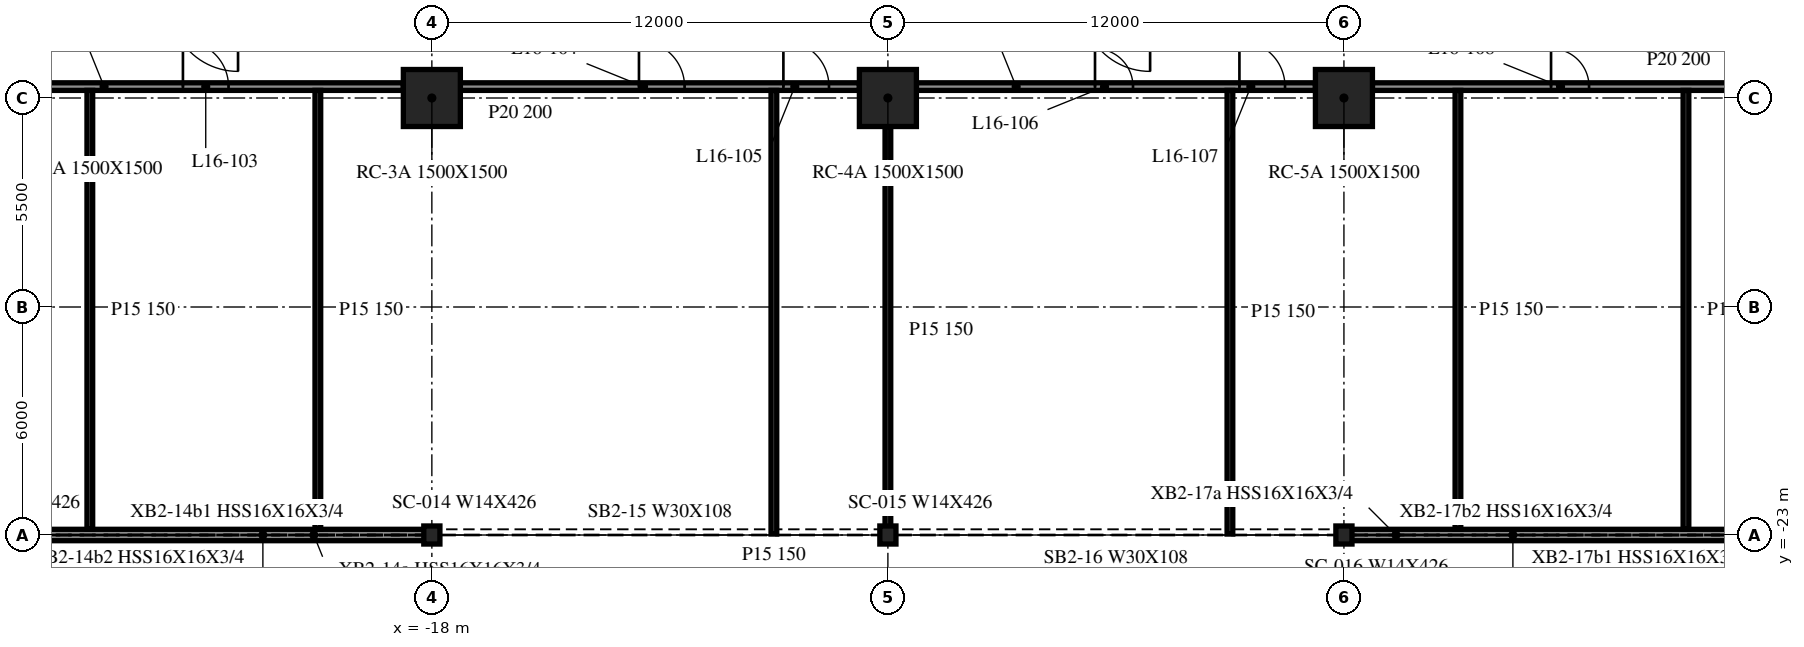
"""IFC4 building model, lengths in metres.
Left out: names, types, materials, properties, quantities, classifications, styles, units other than length and angle.
Written with IfcOpenShell. Run it as: python <this file> out.ifc"""

import sys

from ifc_helpers import new_model, si_unit, direction, frame, frame_2d, origin, origin_2d, place, context, subcontext, project, spatial, rectangle, i_section, extrude, element, fill, save


model = new_model("IFC4")
c1 = context("Model", 3, precision=1e-05, world=origin(), true_north=direction((0.0, 1.0)))
c2 = subcontext(c1, "Body", "Model", "MODEL_VIEW")
j1 = project(units=[si_unit("LENGTHUNIT", "METRE"), si_unit("PLANEANGLEUNIT", "RADIAN")], contexts=[c1])
p1 = place(None, origin())
s1 = spatial("IfcSite", under=j1, at=p1, CompositionType="ELEMENT")
p2 = place(p1, origin())
s2 = spatial("IfcBuilding", under=s1, at=p2, CompositionType="ELEMENT")
p3 = place(p2, frame((0.0, 0.0, 71.8)))
s3 = spatial("IfcBuildingStorey", under=s2, at=p3, CompositionType="ELEMENT", Elevation=71.8)
for number, where, z_axis, x_axis in (
    (1, (-18.0, -11.5, -0.34), (0.0, 0.0, 1.0), (1.0, 0.0, 0.0)),
    (2, (-6.0, -11.5, -0.34), (0.0, 0.0, 1.0), (1.0, 0.0, 0.0)),
    (3, (6.0, -11.5, -0.34), (0.0, 0.0, 1.0), (1.0, 0.0, 0.0)),
):
    element("IfcColumn", number, at=place(p3, frame(where, z_axis=z_axis, x_axis=x_axis)), inside=s3, PredefinedType="COLUMN", context=c2, shape_type="SweptSolid", body=[
        extrude(rectangle(XDim=1.5, YDim=1.5, at=origin_2d()), origin(), (0.0, 0.0, 1.0), 4.3),
    ])
for number, where, z_axis, x_axis in (
    (4, (-18.0, -23.0, -0.34), (0.0, 0.0, 1.0), (1.0, 0.0, 0.0)),
    (5, (-6.0, -23.0, -0.34), (0.0, 0.0, 1.0), (1.0, 0.0, 0.0)),
    (6, (6.0, -23.0, -0.34), (0.0, 0.0, 1.0), (1.0, 0.0, 0.0)),
):
    element("IfcColumn", number, at=place(p3, frame(where, z_axis=z_axis, x_axis=x_axis)), inside=s3, PredefinedType="COLUMN", context=c2, shape_type="SweptSolid", body=[
        extrude(i_section(OverallWidth=0.424, OverallDepth=0.475, WebThickness=0.048, FlangeThickness=0.077, at=origin_2d()), origin(), (0.0, 0.0, 1.0), 4.3),
    ])
for number, where, z_axis, x_axis in (
    (7, (-29.976, -23.0, 0.0), (0.0, 0.0, 1.0), (1.0, 0.0, 0.0)),
    (8, (6.024, -23.0, 0.0), (0.0, 0.0, 1.0), (1.0, 0.0, 0.0)),
):
    element("IfcWall", number, at=place(p3, frame(where, z_axis=z_axis, x_axis=x_axis)), inside=s3, PredefinedType="NOTDEFINED", context=c2, shape_type="SweptSolid", body=[
        extrude(rectangle(XDim=11.952, YDim=0.3, at=frame_2d((5.976, 0.0))), origin(), (0.0, 0.0, 1.0), 3.203),
    ])
p4 = place(p3, frame((-29.25, -11.2, 0.0), z_axis=(0.0, 0.0, 1.0), x_axis=(1.0, 0.0, 0.0)))
e9 = element("IfcWall", 9, at=p4, inside=s3, PredefinedType="PARTITIONING", context=c2, shape_type="SweptSolid", body=[
    extrude(rectangle(XDim=10.5, YDim=0.2, at=frame_2d((5.25, 0.0))), origin(), (0.0, 0.0, 1.0), 3.96),
])
p5 = place(p4, frame((4.7, 0.0, 0.0)))
e10 = element("IfcOpeningElement", 10, at=p5, cuts=e9, PredefinedType="OPENING", context=c2, shape_type="SweptSolid", body=[
    extrude(rectangle(XDim=1.2, YDim=2.1, at=frame_2d((0.6, 1.05))), frame((0.0, 0.11, 0.0), z_axis=(0.0, -1.0, 0.0), x_axis=(1.0, 0.0, 0.0)), (0.0, 0.0, 1.0), 0.22),
])
p6 = place(p3, frame((-17.25, -11.2, 0.0), z_axis=(0.0, 0.0, 1.0), x_axis=(1.0, 0.0, 0.0)))
e11 = element("IfcWall", 11, at=p6, inside=s3, PredefinedType="PARTITIONING", context=c2, shape_type="SweptSolid", body=[
    extrude(rectangle(XDim=10.5, YDim=0.2, at=frame_2d((5.25, 0.0))), origin(), (0.0, 0.0, 1.0), 3.96),
])
p7 = place(p6, frame((4.7, 0.0, 0.0)))
e12 = element("IfcOpeningElement", 12, at=p7, cuts=e11, PredefinedType="OPENING", context=c2, shape_type="SweptSolid", body=[
    extrude(rectangle(XDim=1.2, YDim=2.1, at=frame_2d((0.6, 1.05))), frame((0.0, 0.11, 0.0), z_axis=(0.0, -1.0, 0.0), x_axis=(1.0, 0.0, 0.0)), (0.0, 0.0, 1.0), 0.22),
])
p8 = place(p6, frame((8.5, 0.0, 0.0)))
e13 = element("IfcOpeningElement", 13, at=p8, cuts=e11, PredefinedType="OPENING", context=c2, shape_type="SweptSolid", body=[
    extrude(rectangle(XDim=1.2, YDim=2.1, at=frame_2d((0.6, 1.05))), frame((0.0, 0.11, 0.0), z_axis=(0.0, -1.0, 0.0), x_axis=(1.0, 0.0, 0.0)), (0.0, 0.0, 1.0), 0.22),
])
p9 = place(p3, frame((-5.25, -11.2, 0.0), z_axis=(0.0, 0.0, 1.0), x_axis=(1.0, 0.0, 0.0)))
e14 = element("IfcWall", 14, at=p9, inside=s3, PredefinedType="PARTITIONING", context=c2, shape_type="SweptSolid", body=[
    extrude(rectangle(XDim=10.5, YDim=0.2, at=frame_2d((5.25, 0.0))), origin(), (0.0, 0.0, 1.0), 3.96),
])
p10 = place(p9, frame((4.7, 0.0, 0.0)))
e15 = element("IfcOpeningElement", 15, at=p10, cuts=e14, PredefinedType="OPENING", context=c2, shape_type="SweptSolid", body=[
    extrude(rectangle(XDim=1.0, YDim=2.1, at=frame_2d((0.5, 1.05))), frame((0.0, 0.11, 0.0), z_axis=(0.0, -1.0, 0.0), x_axis=(1.0, 0.0, 0.0)), (0.0, 0.0, 1.0), 0.22),
])
p11 = place(p9, frame((8.5, 0.0, 0.0)))
e16 = element("IfcOpeningElement", 16, at=p11, cuts=e14, PredefinedType="OPENING", context=c2, shape_type="SweptSolid", body=[
    extrude(rectangle(XDim=1.2, YDim=2.1, at=frame_2d((0.6, 1.05))), frame((0.0, 0.11, 0.0), z_axis=(0.0, -1.0, 0.0), x_axis=(1.0, 0.0, 0.0)), (0.0, 0.0, 1.0), 0.22),
])
p12 = place(p3, frame((6.75, -11.2, 0.0), z_axis=(0.0, 0.0, 1.0), x_axis=(1.0, 0.0, 0.0)))
e17 = element("IfcWall", 17, at=p12, inside=s3, PredefinedType="PARTITIONING", context=c2, shape_type="SweptSolid", body=[
    extrude(rectangle(XDim=10.5, YDim=0.2, at=frame_2d((5.25, 0.0))), origin(), (0.0, 0.0, 1.0), 3.96),
])
p13 = place(p12, frame((4.7, 0.0, 0.0)))
e18 = element("IfcOpeningElement", 18, at=p13, cuts=e17, PredefinedType="OPENING", context=c2, shape_type="SweptSolid", body=[
    extrude(rectangle(XDim=1.0, YDim=2.1, at=frame_2d((0.5, 1.05))), frame((0.0, 0.11, 0.0), z_axis=(0.0, -1.0, 0.0), x_axis=(1.0, 0.0, 0.0)), (0.0, 0.0, 1.0), 0.22),
])
for number, where, z_axis, x_axis in (
    (19, (-27.0, -22.85, 0.0), (0.0, 0.0, 1.0), (0.0, 1.0, 0.0)),
    (20, (-21.0, -22.85, 0.0), (0.0, 0.0, 1.0), (0.0, 1.0, 0.0)),
):
    element("IfcWall", number, at=place(p3, frame(where, z_axis=z_axis, x_axis=x_axis)), inside=s3, PredefinedType="PARTITIONING", context=c2, shape_type="SweptSolid", body=[
        extrude(rectangle(XDim=11.55, YDim=0.15, at=frame_2d((5.775, 0.0))), origin(), (0.0, 0.0, 1.0), 3.96),
    ])
p14 = place(p3, frame((-9.0, -22.975, 0.0), z_axis=(0.0, 0.0, 1.0), x_axis=(0.0, 1.0, 0.0)))
e21 = element("IfcWall", 21, at=p14, inside=s3, PredefinedType="PARTITIONING", context=c2, shape_type="SweptSolid", body=[
    extrude(rectangle(XDim=11.675, YDim=0.15, at=frame_2d((5.837, 0.0))), origin(), (0.0, 0.0, 1.0), 3.96),
])
p15 = place(p3, frame((-6.0, -22.975, 0.0), z_axis=(0.0, 0.0, 1.0), x_axis=(0.0, 1.0, 0.0)))
e22 = element("IfcWall", 22, at=p15, inside=s3, PredefinedType="PARTITIONING", context=c2, shape_type="SweptSolid", body=[
    extrude(rectangle(XDim=10.725, YDim=0.15, at=frame_2d((5.363, 0.0))), origin(), (0.0, 0.0, 1.0), 3.96),
])
p16 = place(p3, frame((3.0, -22.975, 0.0), z_axis=(0.0, 0.0, 1.0), x_axis=(0.0, 1.0, 0.0)))
e23 = element("IfcWall", 23, at=p16, inside=s3, PredefinedType="PARTITIONING", context=c2, shape_type="SweptSolid", body=[
    extrude(rectangle(XDim=11.675, YDim=0.15, at=frame_2d((5.837, 0.0))), origin(), (0.0, 0.0, 1.0), 3.96),
])
for number, where, z_axis, x_axis in (
    (24, (9.0, -22.85, 0.0), (0.0, 0.0, 1.0), (0.0, 1.0, 0.0)),
    (25, (15.0, -22.85, 0.0), (0.0, 0.0, 1.0), (0.0, 1.0, 0.0)),
):
    element("IfcWall", number, at=place(p3, frame(where, z_axis=z_axis, x_axis=x_axis)), inside=s3, PredefinedType="PARTITIONING", context=c2, shape_type="SweptSolid", body=[
        extrude(rectangle(XDim=11.55, YDim=0.15, at=frame_2d((5.775, 0.0))), origin(), (0.0, 0.0, 1.0), 3.96),
    ])
p17 = place(p5, origin())
e26 = element("IfcDoor", 26, at=p17, inside=s3, OperationType="SINGLE_SWING_LEFT", PredefinedType="DOOR", context=c2, shape_type="SweptSolid", body=[
    extrude(rectangle(XDim=1.2, YDim=2.1, at=frame_2d((0.6, 1.05))), frame((0.0, 0.025, 0.0), z_axis=(0.0, -1.0, 0.0), x_axis=(1.0, 0.0, 0.0)), (0.0, 0.0, 1.0), 0.05),
])
fill(e10, e26)
p18 = place(p7, origin())
e27 = element("IfcDoor", 27, at=p18, inside=s3, OperationType="SINGLE_SWING_LEFT", PredefinedType="DOOR", context=c2, shape_type="SweptSolid", body=[
    extrude(rectangle(XDim=1.2, YDim=2.1, at=frame_2d((0.6, 1.05))), frame((0.0, 0.025, 0.0), z_axis=(0.0, -1.0, 0.0), x_axis=(1.0, 0.0, 0.0)), (0.0, 0.0, 1.0), 0.05),
])
fill(e12, e27)
p19 = place(p8, origin())
e28 = element("IfcDoor", 28, at=p19, inside=s3, OperationType="SINGLE_SWING_LEFT", PredefinedType="DOOR", context=c2, shape_type="SweptSolid", body=[
    extrude(rectangle(XDim=1.2, YDim=2.1, at=frame_2d((0.6, 1.05))), frame((0.0, 0.025, 0.0), z_axis=(0.0, -1.0, 0.0), x_axis=(1.0, 0.0, 0.0)), (0.0, 0.0, 1.0), 0.05),
])
fill(e13, e28)
p20 = place(p10, origin())
e29 = element("IfcDoor", 29, at=p20, inside=s3, OperationType="SINGLE_SWING_RIGHT", PredefinedType="DOOR", context=c2, shape_type="SweptSolid", body=[
    extrude(rectangle(XDim=1.0, YDim=2.1, at=frame_2d((0.5, 1.05))), frame((0.0, 0.025, 0.0), z_axis=(0.0, -1.0, 0.0), x_axis=(1.0, 0.0, 0.0)), (0.0, 0.0, 1.0), 0.05),
])
fill(e15, e29)
p21 = place(p11, origin())
e30 = element("IfcDoor", 30, at=p21, inside=s3, OperationType="SINGLE_SWING_LEFT", PredefinedType="DOOR", context=c2, shape_type="SweptSolid", body=[
    extrude(rectangle(XDim=1.2, YDim=2.1, at=frame_2d((0.6, 1.05))), frame((0.0, 0.025, 0.0), z_axis=(0.0, -1.0, 0.0), x_axis=(1.0, 0.0, 0.0)), (0.0, 0.0, 1.0), 0.05),
])
fill(e16, e30)
p22 = place(p13, origin())
e31 = element("IfcDoor", 31, at=p22, inside=s3, OperationType="SINGLE_SWING_RIGHT", PredefinedType="DOOR", context=c2, shape_type="SweptSolid", body=[
    extrude(rectangle(XDim=1.0, YDim=2.1, at=frame_2d((0.5, 1.05))), frame((0.0, 0.025, 0.0), z_axis=(0.0, -1.0, 0.0), x_axis=(1.0, 0.0, 0.0)), (0.0, 0.0, 1.0), 0.05),
])
fill(e18, e31)
save(model, sys.argv[1])
